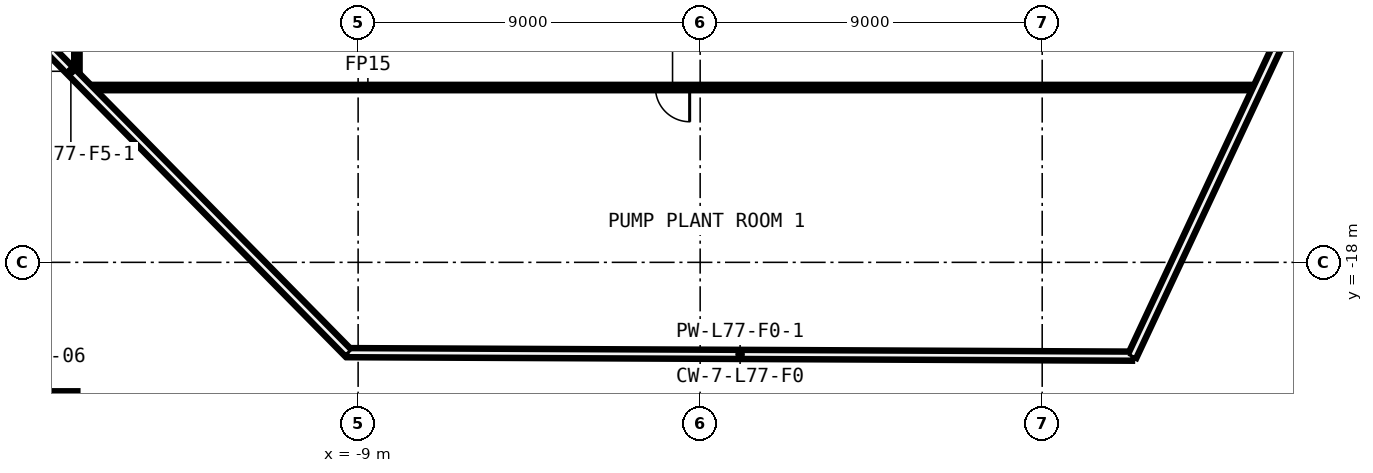
"""IFC4 building model, lengths in metres.
Left out: names, types, materials, properties, quantities, classifications, styles, units other than length and angle.
Written with IfcOpenShell. Run it as: python <this file> out.ifc"""

import sys

from ifc_helpers import new_model, si_unit, direction, frame, frame_2d, origin, origin_2d, place, context, subcontext, project, spatial, rectangle, hollow_rectangle, extrude, element, fill, save


model = new_model("IFC4")
c1 = context("Model", 3, precision=1e-05, world=origin(), true_north=direction((0.0, 1.0)))
c2 = subcontext(c1, "Body", "Model", "MODEL_VIEW")
j1 = project(units=[si_unit("LENGTHUNIT", "METRE"), si_unit("PLANEANGLEUNIT", "RADIAN")], contexts=[c1])
p1 = place(None, origin())
s1 = spatial("IfcSite", under=j1, at=p1, CompositionType="ELEMENT")
p2 = place(p1, origin())
s2 = spatial("IfcBuilding", under=s1, at=p2, CompositionType="ELEMENT")
p3 = place(p2, frame((0.0, 0.0, 359.0)))
s3 = spatial("IfcBuildingStorey", under=s2, at=p3, CompositionType="ELEMENT", Elevation=359.0)
p4 = place(p3, frame((-17.084, -22.089, 0.0), z_axis=(0.0, 0.0, 1.0), x_axis=(1.0, 0.0, 0.0)))
e1 = element("IfcColumn", 1, at=p4, inside=s3, PredefinedType="COLUMN", context=c2, shape_type="SweptSolid", body=[
    extrude(hollow_rectangle(XDim=1.4, YDim=1.4, WallThickness=0.06, at=origin_2d()), origin(), (0.0, 0.0, 1.0), 4.2),
])
p5 = place(p3, frame((14.656, -13.4, 0.0), z_axis=(0.0, 0.0, 1.0), x_axis=(-1.0, 0.0, 0.0)))
e2 = element("IfcWall", 2, at=p5, inside=s3, PredefinedType="PARTITIONING", context=c2, shape_type="SweptSolid", body=[
    extrude(rectangle(XDim=30.765, YDim=0.15, at=frame_2d((15.383, 0.0))), origin(), (0.0, 0.0, 1.0), 3.8),
])
p6 = place(p5, frame((14.933, 0.0, 0.0)))
e3 = element("IfcOpeningElement", 3, at=p6, cuts=e2, PredefinedType="OPENING", context=c2, shape_type="SweptSolid", body=[
    extrude(rectangle(XDim=0.9, YDim=2.1, at=frame_2d((0.45, 1.05))), frame((0.0, 0.085, 0.0), z_axis=(0.0, -1.0, 0.0), x_axis=(1.0, 0.0, 0.0)), (0.0, 0.0, 1.0), 0.17),
])
p7 = place(p3, frame((-16.4, -13.105, 0.0), z_axis=(0.0, 0.0, 1.0), x_axis=(0.0, 1.0, 0.0)))
e4 = element("IfcWall", 4, at=p7, inside=s3, PredefinedType="PARTITIONING", context=c2, shape_type="SweptSolid", body=[
    extrude(rectangle(XDim=22.641, YDim=0.15, at=frame_2d((11.321, 0.0))), origin(), (0.0, 0.0, 1.0), 3.8),
])
p8 = place(p7, frame((10.871, 0.0, 0.0)))
e5 = element("IfcOpeningElement", 5, at=p8, cuts=e4, PredefinedType="OPENING", context=c2, shape_type="SweptSolid", body=[
    extrude(rectangle(XDim=0.9, YDim=2.1, at=frame_2d((0.45, 1.05))), frame((0.0, 0.085, 0.0), z_axis=(0.0, -1.0, 0.0), x_axis=(1.0, 0.0, 0.0)), (0.0, 0.0, 1.0), 0.17),
])
p9 = place(p3, frame((-9.266, -20.377, 0.0), z_axis=(0.0, 0.0, 1.0), x_axis=(0.999990050783, -0.004460755013, 0.0)))
e6 = element("IfcWall", 6, at=p9, inside=s3, PredefinedType="SOLIDWALL", context=c2, shape_type="SweptSolid", body=[
    extrude(rectangle(XDim=20.634, YDim=0.25, at=frame_2d((10.317, 0.0))), origin(), (0.0, 0.0, 1.0), 3.8),
])
p10 = place(p3, frame((11.367, -20.469, 0.0), z_axis=(0.0, 0.0, 1.0), x_axis=(0.424125024155, 0.905603646131, 0.0)))
e7 = element("IfcWall", 7, at=p10, inside=s3, PredefinedType="SOLIDWALL", context=c2, shape_type="SweptSolid", body=[
    extrude(rectangle(XDim=28.801, YDim=0.25, at=frame_2d((14.401, 0.0))), origin(), (0.0, 0.0, 1.0), 3.8),
])
p11 = place(p3, frame((-23.851, -5.568, 0.0), z_axis=(0.0, 0.0, 1.0), x_axis=(0.701718568407, -0.712454244673, 0.0)))
e8 = element("IfcWall", 8, at=p11, inside=s3, PredefinedType="SOLIDWALL", context=c2, shape_type="SweptSolid", body=[
    extrude(rectangle(XDim=20.785, YDim=0.25, at=frame_2d((10.393, 0.0))), origin(), (0.0, 0.0, 1.0), 3.8),
])
p12 = place(p6, origin())
e9 = element("IfcDoor", 9, at=p12, inside=s3, OperationType="SINGLE_SWING_LEFT", PredefinedType="DOOR", context=c2, shape_type="SweptSolid", body=[
    extrude(rectangle(XDim=0.9, YDim=2.1, at=frame_2d((0.45, 1.05))), frame((0.0, 0.025, 0.0), z_axis=(0.0, -1.0, 0.0), x_axis=(1.0, 0.0, 0.0)), (0.0, 0.0, 1.0), 0.05),
])
fill(e3, e9)
save(model, sys.argv[1])
